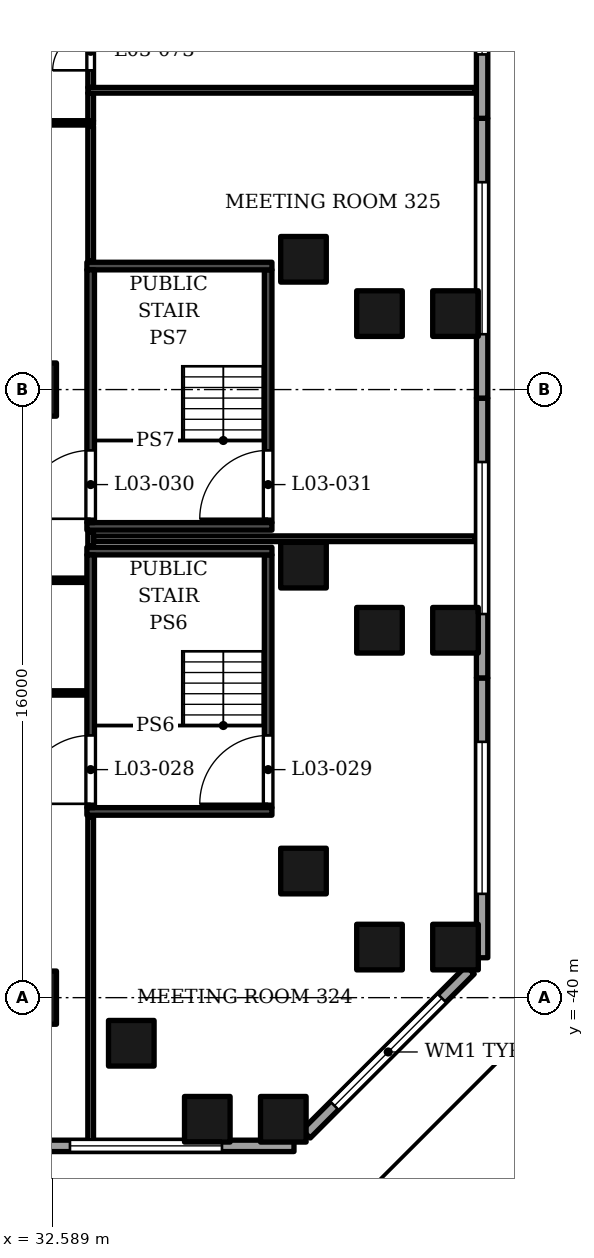
"""IFC4 building model, lengths in metres.
Left out: names, types, materials, properties, quantities, classifications, styles, units other than length and angle.
Written with IfcOpenShell. Run it as: python <this file> out.ifc"""

import sys

from ifc_helpers import new_model, si_unit, direction, frame, frame_2d, origin, origin_2d, place, context, subcontext, project, spatial, rectangle, extrude, element, fill, save


model = new_model("IFC4")
c1 = context("Model", 3, precision=1e-05, world=origin(), true_north=direction((0.0, 1.0)))
c2 = subcontext(c1, "Body", "Model", "MODEL_VIEW")
j1 = project(units=[si_unit("LENGTHUNIT", "METRE"), si_unit("PLANEANGLEUNIT", "RADIAN")], contexts=[c1])
p1 = place(None, origin())
s1 = spatial("IfcSite", under=j1, at=p1, CompositionType="ELEMENT")
p2 = place(p1, origin())
s2 = spatial("IfcBuilding", under=s1, at=p2, CompositionType="ELEMENT")
p3 = place(p2, frame((0.0, 0.0, 29.0)))
s3 = spatial("IfcBuildingStorey", under=s2, at=p3, CompositionType="ELEMENT", Elevation=29.0)
for number, where, z_axis, x_axis in (
    (1, (32.0, -40.0, 0.0), (0.0, 0.0, 1.0), (1.0, 0.0, 0.0)),
    (2, (32.0, -24.0, 0.0), (0.0, 0.0, 1.0), (1.0, 0.0, 0.0)),
):
    element("IfcColumn", number, at=place(p3, frame(where, z_axis=z_axis, x_axis=x_axis)), inside=s3, PredefinedType="COLUMN", context=c2, shape_type="SweptSolid", body=[
        extrude(rectangle(XDim=1.4, YDim=1.4, at=origin_2d()), origin(), (0.0, 0.0, 1.0), 5.5),
    ])
for number, where, z_axis, x_axis in (
    (3, (39.2, -36.669, 0.0), (0.0, 0.0, 1.0), (1.0, 0.0, 0.0)),
    (4, (34.669, -41.2, 0.0), (0.0, 0.0, 1.0), (1.0, 0.0, 0.0)),
    (5, (39.2, -20.572, 0.0), (0.0, 0.0, 1.0), (1.0, 0.0, 0.0)),
    (6, (39.2, -28.62, 0.0), (0.0, 0.0, 1.0), (1.0, 0.0, 0.0)),
    (7, (41.2, -38.669, 0.0), (0.0, 0.0, 1.0), (1.0, 0.0, 0.0)),
    (8, (36.669, -43.2, 0.0), (0.0, 0.0, 1.0), (1.0, 0.0, 0.0)),
    (9, (41.2, -22.001, 0.0), (0.0, 0.0, 1.0), (1.0, 0.0, 0.0)),
    (10, (41.2, -30.333, 0.0), (0.0, 0.0, 1.0), (1.0, 0.0, 0.0)),
    (11, (43.2, -38.669, 0.0), (0.0, 0.0, 1.0), (1.0, 0.0, 0.0)),
    (12, (38.669, -43.2, 0.0), (0.0, 0.0, 1.0), (1.0, 0.0, 0.0)),
    (13, (43.2, -22.001, 0.0), (0.0, 0.0, 1.0), (1.0, 0.0, 0.0)),
    (14, (43.2, -30.333, 0.0), (0.0, 0.0, 1.0), (1.0, 0.0, 0.0)),
):
    element("IfcColumn", number, at=place(p3, frame(where, z_axis=z_axis, x_axis=x_axis)), inside=s3, PredefinedType="COLUMN", context=c2, shape_type="SweptSolid", body=[
        extrude(rectangle(XDim=1.2, YDim=1.2, at=origin_2d()), origin(), (0.0, 0.0, 1.0), 5.5),
    ])
p4 = place(p3, frame((31.16, -43.9, 0.0), z_axis=(0.0, 0.0, 1.0), x_axis=(1.0, 0.0, 0.0)))
e15 = element("IfcWall", 15, at=p4, inside=s3, PredefinedType="SOLIDWALL", context=c2, shape_type="SweptSolid", body=[
    extrude(rectangle(XDim=7.79, YDim=0.3, at=frame_2d((3.895, 0.0))), origin(), (0.0, 0.0, 1.0), 4.1),
])
p5 = place(p4, frame((1.895, 0.0, 1.0)))
e16 = element("IfcOpeningElement", 16, at=p5, cuts=e15, PredefinedType="OPENING", context=c2, shape_type="SweptSolid", body=[
    extrude(rectangle(XDim=4.0, YDim=1.8, at=frame_2d((2.0, 0.9))), frame((0.0, 0.16, 0.0), z_axis=(0.0, -1.0, 0.0), x_axis=(1.0, 0.0, 0.0)), (0.0, 0.0, 1.0), 0.32),
])
p6 = place(p3, frame((39.271, -43.588, 0.0), z_axis=(0.0, 0.0, 1.0), x_axis=(0.707106781187, 0.707106781187, 0.0)))
e17 = element("IfcWall", 17, at=p6, inside=s3, PredefinedType="SOLIDWALL", context=c2, shape_type="SweptSolid", body=[
    extrude(rectangle(XDim=6.105, YDim=0.3, at=frame_2d((3.052, 0.0))), origin(), (0.0, 0.0, 1.0), 4.1),
])
p7 = place(p6, frame((1.052, 0.0, 1.0)))
e18 = element("IfcOpeningElement", 18, at=p7, cuts=e17, PredefinedType="OPENING", context=c2, shape_type="SweptSolid", body=[
    extrude(rectangle(XDim=4.0, YDim=1.8, at=frame_2d((2.0, 0.9))), frame((0.0, 0.16, 0.0), z_axis=(0.0, -1.0, 0.0), x_axis=(1.0, 0.0, 0.0)), (0.0, 0.0, 1.0), 0.32),
])
p8 = place(p3, frame((43.9, -38.95, 0.0), z_axis=(0.0, 0.0, 1.0), x_axis=(0.0, 1.0, 0.0)))
e19 = element("IfcWall", 19, at=p8, inside=s3, PredefinedType="SOLIDWALL", context=c2, shape_type="SweptSolid", body=[
    extrude(rectangle(XDim=7.363, YDim=0.3, at=frame_2d((3.681, 0.0))), origin(), (0.0, 0.0, 1.0), 4.1),
])
p9 = place(p8, frame((1.681, 0.0, 1.0)))
e20 = element("IfcOpeningElement", 20, at=p9, cuts=e19, PredefinedType="OPENING", context=c2, shape_type="SweptSolid", body=[
    extrude(rectangle(XDim=4.0, YDim=1.8, at=frame_2d((2.0, 0.9))), frame((0.0, 0.16, 0.0), z_axis=(0.0, -1.0, 0.0), x_axis=(1.0, 0.0, 0.0)), (0.0, 0.0, 1.0), 0.32),
])
p10 = place(p3, frame((43.9, -31.587, 0.0), z_axis=(0.0, 0.0, 1.0), x_axis=(0.0, 1.0, 0.0)))
e21 = element("IfcWall", 21, at=p10, inside=s3, PredefinedType="SOLIDWALL", context=c2, shape_type="SweptSolid", body=[
    extrude(rectangle(XDim=7.362, YDim=0.3, at=frame_2d((3.681, 0.0))), origin(), (0.0, 0.0, 1.0), 4.1),
])
p11 = place(p10, frame((1.681, 0.0, 1.0)))
e22 = element("IfcOpeningElement", 22, at=p11, cuts=e21, PredefinedType="OPENING", context=c2, shape_type="SweptSolid", body=[
    extrude(rectangle(XDim=4.0, YDim=1.8, at=frame_2d((2.0, 0.9))), frame((0.0, 0.16, 0.0), z_axis=(0.0, -1.0, 0.0), x_axis=(1.0, 0.0, 0.0)), (0.0, 0.0, 1.0), 0.32),
])
p12 = place(p3, frame((43.9, -24.225, 0.0), z_axis=(0.0, 0.0, 1.0), x_axis=(0.0, 1.0, 0.0)))
e23 = element("IfcWall", 23, at=p12, inside=s3, PredefinedType="SOLIDWALL", context=c2, shape_type="SweptSolid", body=[
    extrude(rectangle(XDim=7.363, YDim=0.3, at=frame_2d((3.681, 0.0))), origin(), (0.0, 0.0, 1.0), 4.1),
])
p13 = place(p12, frame((1.681, 0.0, 1.0)))
e24 = element("IfcOpeningElement", 24, at=p13, cuts=e23, PredefinedType="OPENING", context=c2, shape_type="SweptSolid", body=[
    extrude(rectangle(XDim=4.0, YDim=1.8, at=frame_2d((2.0, 0.9))), frame((0.0, 0.16, 0.0), z_axis=(0.0, -1.0, 0.0), x_axis=(1.0, 0.0, 0.0)), (0.0, 0.0, 1.0), 0.32),
])
p14 = place(p3, frame((43.9, -16.863, 0.0), z_axis=(0.0, 0.0, 1.0), x_axis=(0.0, 1.0, 0.0)))
e25 = element("IfcWall", 25, at=p14, inside=s3, PredefinedType="SOLIDWALL", context=c2, shape_type="SweptSolid", body=[
    extrude(rectangle(XDim=7.363, YDim=0.3, at=frame_2d((3.681, 0.0))), origin(), (0.0, 0.0, 1.0), 4.1),
])
p15 = place(p14, frame((1.681, 0.0, 1.0)))
e26 = element("IfcOpeningElement", 26, at=p15, cuts=e25, PredefinedType="OPENING", context=c2, shape_type="SweptSolid", body=[
    extrude(rectangle(XDim=4.0, YDim=1.8, at=frame_2d((2.0, 0.9))), frame((0.0, 0.16, 0.0), z_axis=(0.0, -1.0, 0.0), x_axis=(1.0, 0.0, 0.0)), (0.0, 0.0, 1.0), 0.32),
])
p16 = place(p3, frame((37.75, -43.85, 5.5), z_axis=(0.0, 0.0, 1.0), x_axis=(1.0, 0.0, 0.0)))
e27 = element("IfcWall", 27, at=p16, inside=s3, PredefinedType="PARAPET", context=c2, shape_type="SweptSolid", body=[
    extrude(rectangle(XDim=1.25, YDim=0.3, at=frame_2d((0.625, 0.0))), origin(), (0.0, 0.0, 1.0), 1.1),
])
p17 = place(p3, frame((39.042, -43.745, 5.5), z_axis=(0.0, 0.0, 1.0), x_axis=(0.707124572946, 0.70708898898, 0.0)))
e28 = element("IfcWall", 28, at=p17, inside=s3, PredefinedType="PARAPET", context=c2, shape_type="SweptSolid", body=[
    extrude(rectangle(XDim=6.861, YDim=0.3, at=frame_2d((3.431, 0.0))), origin(), (0.0, 0.0, 1.0), 1.1),
])
for number, where, z_axis, x_axis in (
    (29, (43.85, -38.79, 5.5), (0.0, 0.0, 1.0), (0.0, 1.0, 0.0)),
    (30, (43.85, -24.093, 5.5), (0.0, 0.0, 1.0), (0.0, 1.0, 0.0)),
):
    element("IfcWall", number, at=place(p3, frame(where, z_axis=z_axis, x_axis=x_axis)), inside=s3, PredefinedType="PARAPET", context=c2, shape_type="SweptSolid", body=[
        extrude(rectangle(XDim=14.698, YDim=0.3, at=frame_2d((7.349, 0.0))), origin(), (0.0, 0.0, 1.0), 1.1),
    ])
for number, where, z_axis, x_axis in (
    (31, (33.5, -35.1, 0.0), (0.0, 0.0, 1.0), (1.0, 0.0, 0.0)),
    (32, (33.5, -28.25, 0.0), (0.0, 0.0, 1.0), (1.0, 0.0, 0.0)),
):
    element("IfcWall", number, at=place(p3, frame(where, z_axis=z_axis, x_axis=x_axis)), inside=s3, PredefinedType="SOLIDWALL", context=c2, shape_type="SweptSolid", body=[
        extrude(rectangle(XDim=4.87, YDim=0.2, at=frame_2d((2.435, 0.0))), origin(), (0.0, 0.0, 1.0), 5.05),
    ])
p18 = place(p3, frame((33.6, -35.0, 0.0), z_axis=(0.0, 0.0, 1.0), x_axis=(0.0, 1.0, 0.0)))
e33 = element("IfcWall", 33, at=p18, inside=s3, PredefinedType="SOLIDWALL", context=c2, shape_type="SweptSolid", body=[
    extrude(rectangle(XDim=6.65, YDim=0.2, at=frame_2d((3.325, 0.0))), origin(), (0.0, 0.0, 1.0), 5.05),
])
p19 = place(p18, frame((0.1, 0.0, 0.0)))
e34 = element("IfcOpeningElement", 34, at=p19, cuts=e33, PredefinedType="OPENING", context=c2, shape_type="SweptSolid", body=[
    extrude(rectangle(XDim=1.8, YDim=2.4, at=frame_2d((0.9, 1.2))), frame((0.0, 0.11, 0.0), z_axis=(0.0, -1.0, 0.0), x_axis=(1.0, 0.0, 0.0)), (0.0, 0.0, 1.0), 0.22),
])
p20 = place(p3, frame((38.27, -35.0, 0.0), z_axis=(0.0, 0.0, 1.0), x_axis=(0.0, 1.0, 0.0)))
e35 = element("IfcWall", 35, at=p20, inside=s3, PredefinedType="SOLIDWALL", context=c2, shape_type="SweptSolid", body=[
    extrude(rectangle(XDim=6.65, YDim=0.2, at=frame_2d((3.325, 0.0))), origin(), (0.0, 0.0, 1.0), 5.05),
])
p21 = place(p20, frame((0.1, 0.0, 0.0)))
e36 = element("IfcOpeningElement", 36, at=p21, cuts=e35, PredefinedType="OPENING", context=c2, shape_type="SweptSolid", body=[
    extrude(rectangle(XDim=1.8, YDim=2.4, at=frame_2d((0.9, 1.2))), frame((0.0, 0.11, 0.0), z_axis=(0.0, -1.0, 0.0), x_axis=(1.0, 0.0, 0.0)), (0.0, 0.0, 1.0), 0.22),
])
for number, where, z_axis, x_axis in (
    (37, (33.5, -27.6, 0.0), (0.0, 0.0, 1.0), (1.0, 0.0, 0.0)),
    (38, (33.5, -20.75, 0.0), (0.0, 0.0, 1.0), (1.0, 0.0, 0.0)),
):
    element("IfcWall", number, at=place(p3, frame(where, z_axis=z_axis, x_axis=x_axis)), inside=s3, PredefinedType="SOLIDWALL", context=c2, shape_type="SweptSolid", body=[
        extrude(rectangle(XDim=4.87, YDim=0.2, at=frame_2d((2.435, 0.0))), origin(), (0.0, 0.0, 1.0), 5.05),
    ])
p22 = place(p3, frame((33.6, -27.5, 0.0), z_axis=(0.0, 0.0, 1.0), x_axis=(0.0, 1.0, 0.0)))
e39 = element("IfcWall", 39, at=p22, inside=s3, PredefinedType="SOLIDWALL", context=c2, shape_type="SweptSolid", body=[
    extrude(rectangle(XDim=6.65, YDim=0.2, at=frame_2d((3.325, 0.0))), origin(), (0.0, 0.0, 1.0), 5.05),
])
p23 = place(p22, frame((0.1, 0.0, 0.0)))
e40 = element("IfcOpeningElement", 40, at=p23, cuts=e39, PredefinedType="OPENING", context=c2, shape_type="SweptSolid", body=[
    extrude(rectangle(XDim=1.8, YDim=2.4, at=frame_2d((0.9, 1.2))), frame((0.0, 0.11, 0.0), z_axis=(0.0, -1.0, 0.0), x_axis=(1.0, 0.0, 0.0)), (0.0, 0.0, 1.0), 0.22),
])
p24 = place(p3, frame((38.27, -27.5, 0.0), z_axis=(0.0, 0.0, 1.0), x_axis=(0.0, 1.0, 0.0)))
e41 = element("IfcWall", 41, at=p24, inside=s3, PredefinedType="SOLIDWALL", context=c2, shape_type="SweptSolid", body=[
    extrude(rectangle(XDim=6.65, YDim=0.2, at=frame_2d((3.325, 0.0))), origin(), (0.0, 0.0, 1.0), 5.05),
])
p25 = place(p24, frame((0.1, 0.0, 0.0)))
e42 = element("IfcOpeningElement", 42, at=p25, cuts=e41, PredefinedType="OPENING", context=c2, shape_type="SweptSolid", body=[
    extrude(rectangle(XDim=1.8, YDim=2.4, at=frame_2d((0.9, 1.2))), frame((0.0, 0.11, 0.0), z_axis=(0.0, -1.0, 0.0), x_axis=(1.0, 0.0, 0.0)), (0.0, 0.0, 1.0), 0.22),
])
p26 = place(p3, frame((33.6, -43.77, 0.0), z_axis=(0.0, 0.0, 1.0), x_axis=(0.0, 1.0, 0.0)))
e43 = element("IfcWall", 43, at=p26, inside=s3, PredefinedType="PARTITIONING", context=c2, shape_type="SweptSolid", body=[
    extrude(rectangle(XDim=8.53, YDim=0.15, at=frame_2d((4.265, 0.0))), origin(), (0.0, 0.0, 1.0), 3.85),
])
p27 = place(p3, frame((14.77, -31.982, 0.0), z_axis=(0.0, 0.0, 1.0), x_axis=(1.0, 0.0, 0.0)))
e44 = element("IfcWall", 44, at=p27, inside=s3, PredefinedType="PARTITIONING", context=c2, shape_type="SweptSolid", body=[
    extrude(rectangle(XDim=18.69, YDim=0.115, at=frame_2d((9.345, 0.0))), origin(), (0.0, 0.0, 1.0), 3.85),
])
p28 = place(p27, frame((13.479, 0.0, 0.0)))
e45 = element("IfcOpeningElement", 45, at=p28, cuts=e44, PredefinedType="OPENING", context=c2, shape_type="SweptSolid", body=[
    extrude(rectangle(XDim=1.0, YDim=2.1, at=frame_2d((0.5, 1.05))), frame((0.0, 0.067, 0.0), z_axis=(0.0, -1.0, 0.0), x_axis=(1.0, 0.0, 0.0)), (0.0, 0.0, 1.0), 0.135),
])
p29 = place(p3, frame((14.77, -29.018, 0.0), z_axis=(0.0, 0.0, 1.0), x_axis=(1.0, 0.0, 0.0)))
e46 = element("IfcWall", 46, at=p29, inside=s3, PredefinedType="PARTITIONING", context=c2, shape_type="SweptSolid", body=[
    extrude(rectangle(XDim=18.69, YDim=0.115, at=frame_2d((9.345, 0.0))), origin(), (0.0, 0.0, 1.0), 3.85),
])
p30 = place(p3, frame((33.6, -28.11, 0.0), z_axis=(0.0, 0.0, 1.0), x_axis=(0.0, 1.0, 0.0)))
e47 = element("IfcWall", 47, at=p30, inside=s3, PredefinedType="PARTITIONING", context=c2, shape_type="SweptSolid", body=[
    extrude(rectangle(XDim=0.37, YDim=0.15, at=frame_2d((0.185, 0.0))), origin(), (0.0, 0.0, 1.0), 5.05),
])
p31 = place(p3, frame((33.675, -27.925, 0.0), z_axis=(0.0, 0.0, 1.0), x_axis=(1.0, 0.0, 0.0)))
e48 = element("IfcWall", 48, at=p31, inside=s3, PredefinedType="PARTITIONING", context=c2, shape_type="SweptSolid", body=[
    extrude(rectangle(XDim=10.045, YDim=0.15, at=frame_2d((5.022, 0.0))), origin(), (0.0, 0.0, 1.0), 4.15),
])
p32 = place(p3, frame((33.6, -20.61, 0.0), z_axis=(0.0, 0.0, 1.0), x_axis=(0.0, 1.0, 0.0)))
e49 = element("IfcWall", 49, at=p32, inside=s3, PredefinedType="PARTITIONING", context=c2, shape_type="SweptSolid", body=[
    extrude(rectangle(XDim=3.535, YDim=0.15, at=frame_2d((1.768, 0.0))), origin(), (0.0, 0.0, 1.0), 5.05),
])
p33 = place(p3, frame((14.77, -16.982, 0.0), z_axis=(0.0, 0.0, 1.0), x_axis=(1.0, 0.0, 0.0)))
e50 = element("IfcWall", 50, at=p33, inside=s3, PredefinedType="PARTITIONING", context=c2, shape_type="SweptSolid", body=[
    extrude(rectangle(XDim=18.905, YDim=0.115, at=frame_2d((9.453, 0.0))), origin(), (0.0, 0.0, 1.0), 3.85),
])
p34 = place(p33, frame((13.48, 0.0, 0.0)))
e51 = element("IfcOpeningElement", 51, at=p34, cuts=e50, PredefinedType="OPENING", context=c2, shape_type="SweptSolid", body=[
    extrude(rectangle(XDim=1.0, YDim=2.1, at=frame_2d((0.5, 1.05))), frame((0.0, 0.067, 0.0), z_axis=(0.0, -1.0, 0.0), x_axis=(1.0, 0.0, 0.0)), (0.0, 0.0, 1.0), 0.135),
])
p35 = place(p3, frame((33.6, -16.925, 0.0), z_axis=(0.0, 0.0, 1.0), x_axis=(0.0, 1.0, 0.0)))
e52 = element("IfcWall", 52, at=p35, inside=s3, PredefinedType="PARTITIONING", context=c2, shape_type="SweptSolid", body=[
    extrude(rectangle(XDim=0.725, YDim=0.15, at=frame_2d((0.363, 0.0))), origin(), (0.0, 0.0, 1.0), 5.05),
])
p36 = place(p3, frame((33.525, -16.125, 0.0), z_axis=(0.0, 0.0, 1.0), x_axis=(1.0, 0.0, 0.0)))
e53 = element("IfcWall", 53, at=p36, inside=s3, PredefinedType="PARTITIONING", context=c2, shape_type="SweptSolid", body=[
    extrude(rectangle(XDim=10.195, YDim=0.15, at=frame_2d((5.098, 0.0))), origin(), (0.0, 0.0, 1.0), 4.15),
])
p37 = place(p3, frame((33.6, -16.05, 0.0), z_axis=(0.0, 0.0, 1.0), x_axis=(0.0, 1.0, 0.0)))
e54 = element("IfcWall", 54, at=p37, inside=s3, PredefinedType="PARTITIONING", context=c2, shape_type="SweptSolid", body=[
    extrude(rectangle(XDim=1.975, YDim=0.15, at=frame_2d((0.988, 0.0))), origin(), (0.0, 0.0, 1.0), 5.05),
])
p38 = place(p37, frame((0.45, 0.0, 0.0)))
e55 = element("IfcOpeningElement", 55, at=p38, cuts=e54, PredefinedType="OPENING", context=c2, shape_type="SweptSolid", body=[
    extrude(rectangle(XDim=1.0, YDim=2.1, at=frame_2d((0.5, 1.05))), frame((0.0, 0.085, 0.0), z_axis=(0.0, -1.0, 0.0), x_axis=(1.0, 0.0, 0.0)), (0.0, 0.0, 1.0), 0.17),
])
p39 = place(p5, origin())
e56 = element("IfcWindow", 56, at=p39, inside=s3, PartitioningType="SINGLE_PANEL", PredefinedType="WINDOW", context=c2, shape_type="SweptSolid", body=[
    extrude(rectangle(XDim=4.0, YDim=1.8, at=frame_2d((2.0, 0.9))), frame((0.0, 0.03, 0.0), z_axis=(0.0, -1.0, 0.0), x_axis=(1.0, 0.0, 0.0)), (0.0, 0.0, 1.0), 0.06),
])
fill(e16, e56)
p40 = place(p7, origin())
e57 = element("IfcWindow", 57, at=p40, inside=s3, PartitioningType="SINGLE_PANEL", PredefinedType="WINDOW", context=c2, shape_type="SweptSolid", body=[
    extrude(rectangle(XDim=4.0, YDim=1.8, at=frame_2d((2.0, 0.9))), frame((0.0, 0.03, 0.0), z_axis=(0.0, -1.0, 0.0), x_axis=(1.0, 0.0, 0.0)), (0.0, 0.0, 1.0), 0.06),
])
fill(e18, e57)
p41 = place(p9, origin())
e58 = element("IfcWindow", 58, at=p41, inside=s3, PartitioningType="SINGLE_PANEL", PredefinedType="WINDOW", context=c2, shape_type="SweptSolid", body=[
    extrude(rectangle(XDim=4.0, YDim=1.8, at=frame_2d((2.0, 0.9))), frame((0.0, 0.03, 0.0), z_axis=(0.0, -1.0, 0.0), x_axis=(1.0, 0.0, 0.0)), (0.0, 0.0, 1.0), 0.06),
])
fill(e20, e58)
p42 = place(p11, origin())
e59 = element("IfcWindow", 59, at=p42, inside=s3, PartitioningType="SINGLE_PANEL", PredefinedType="WINDOW", context=c2, shape_type="SweptSolid", body=[
    extrude(rectangle(XDim=4.0, YDim=1.8, at=frame_2d((2.0, 0.9))), frame((0.0, 0.03, 0.0), z_axis=(0.0, -1.0, 0.0), x_axis=(1.0, 0.0, 0.0)), (0.0, 0.0, 1.0), 0.06),
])
fill(e22, e59)
p43 = place(p13, origin())
e60 = element("IfcWindow", 60, at=p43, inside=s3, PartitioningType="SINGLE_PANEL", PredefinedType="WINDOW", context=c2, shape_type="SweptSolid", body=[
    extrude(rectangle(XDim=4.0, YDim=1.8, at=frame_2d((2.0, 0.9))), frame((0.0, 0.03, 0.0), z_axis=(0.0, -1.0, 0.0), x_axis=(1.0, 0.0, 0.0)), (0.0, 0.0, 1.0), 0.06),
])
fill(e24, e60)
p44 = place(p15, origin())
e61 = element("IfcWindow", 61, at=p44, inside=s3, PartitioningType="SINGLE_PANEL", PredefinedType="WINDOW", context=c2, shape_type="SweptSolid", body=[
    extrude(rectangle(XDim=4.0, YDim=1.8, at=frame_2d((2.0, 0.9))), frame((0.0, 0.03, 0.0), z_axis=(0.0, -1.0, 0.0), x_axis=(1.0, 0.0, 0.0)), (0.0, 0.0, 1.0), 0.06),
])
fill(e26, e61)
p45 = place(p19, origin())
e62 = element("IfcDoor", 62, at=p45, inside=s3, OperationType="DOUBLE_DOOR_SINGLE_SWING", PredefinedType="DOOR", context=c2, shape_type="SweptSolid", body=[
    extrude(rectangle(XDim=1.8, YDim=2.4, at=frame_2d((0.9, 1.2))), frame((0.0, 0.025, 0.0), z_axis=(0.0, -1.0, 0.0), x_axis=(1.0, 0.0, 0.0)), (0.0, 0.0, 1.0), 0.05),
])
fill(e34, e62)
p46 = place(p21, origin())
e63 = element("IfcDoor", 63, at=p46, inside=s3, OperationType="DOUBLE_DOOR_SINGLE_SWING", PredefinedType="DOOR", context=c2, shape_type="SweptSolid", body=[
    extrude(rectangle(XDim=1.8, YDim=2.4, at=frame_2d((0.9, 1.2))), frame((0.0, 0.025, 0.0), z_axis=(0.0, -1.0, 0.0), x_axis=(1.0, 0.0, 0.0)), (0.0, 0.0, 1.0), 0.05),
])
fill(e36, e63)
p47 = place(p23, origin())
e64 = element("IfcDoor", 64, at=p47, inside=s3, OperationType="DOUBLE_DOOR_SINGLE_SWING", PredefinedType="DOOR", context=c2, shape_type="SweptSolid", body=[
    extrude(rectangle(XDim=1.8, YDim=2.4, at=frame_2d((0.9, 1.2))), frame((0.0, 0.025, 0.0), z_axis=(0.0, -1.0, 0.0), x_axis=(1.0, 0.0, 0.0)), (0.0, 0.0, 1.0), 0.05),
])
fill(e40, e64)
p48 = place(p25, origin())
e65 = element("IfcDoor", 65, at=p48, inside=s3, OperationType="DOUBLE_DOOR_SINGLE_SWING", PredefinedType="DOOR", context=c2, shape_type="SweptSolid", body=[
    extrude(rectangle(XDim=1.8, YDim=2.4, at=frame_2d((0.9, 1.2))), frame((0.0, 0.025, 0.0), z_axis=(0.0, -1.0, 0.0), x_axis=(1.0, 0.0, 0.0)), (0.0, 0.0, 1.0), 0.05),
])
fill(e42, e65)
p49 = place(p38, origin())
e66 = element("IfcDoor", 66, at=p49, inside=s3, OperationType="SINGLE_SWING_LEFT", PredefinedType="DOOR", context=c2, shape_type="SweptSolid", body=[
    extrude(rectangle(XDim=1.0, YDim=2.1, at=frame_2d((0.5, 1.05))), frame((0.0, 0.025, 0.0), z_axis=(0.0, -1.0, 0.0), x_axis=(1.0, 0.0, 0.0)), (0.0, 0.0, 1.0), 0.05),
])
fill(e55, e66)
save(model, sys.argv[1])
